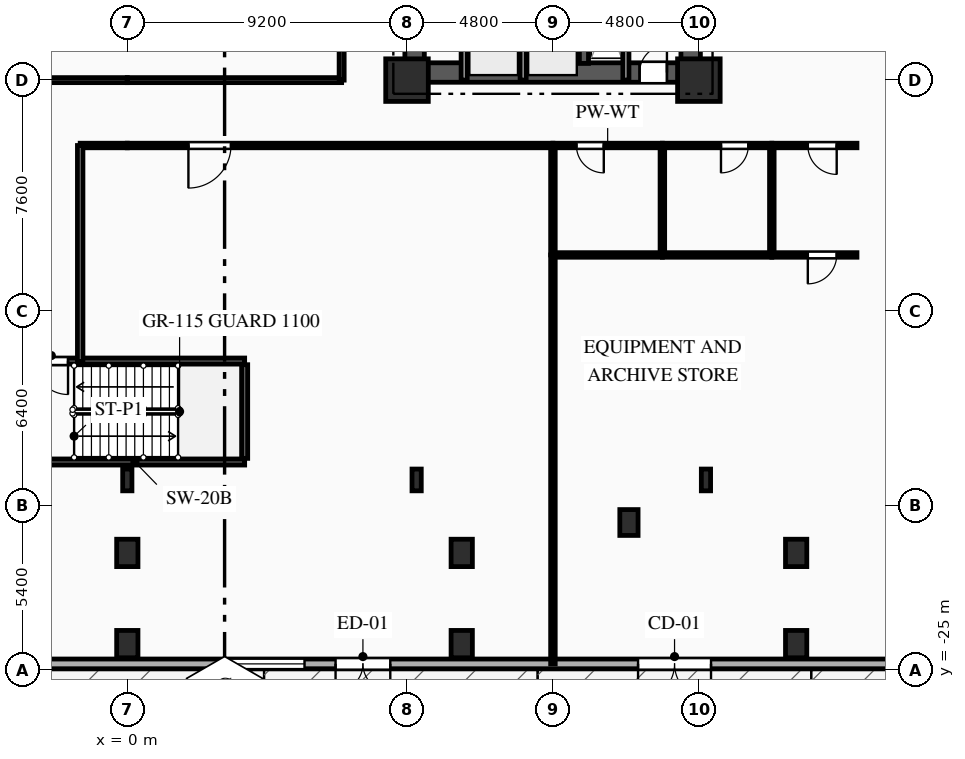
"""IFC4 building model, lengths in metres.
Left out: names, types, materials, properties, quantities, classifications, styles, units other than length and angle.
Written with IfcOpenShell. Run it as: python <this file> out.ifc"""

import sys

from ifc_helpers import new_model, si_unit, direction, frame, frame_2d, origin, origin_2d, place, context, subcontext, project, spatial, rectangle, i_section, extrude, element, fill, save


model = new_model("IFC4")
c1 = context("Model", 3, precision=1e-05, world=origin(), true_north=direction((0.0, 1.0)))
c2 = subcontext(c1, "Body", "Model", "MODEL_VIEW")
j1 = project(units=[si_unit("LENGTHUNIT", "METRE"), si_unit("PLANEANGLEUNIT", "RADIAN")], contexts=[c1])
p1 = place(None, origin())
s1 = spatial("IfcSite", under=j1, at=p1, CompositionType="ELEMENT")
p2 = place(p1, origin())
s2 = spatial("IfcBuilding", under=s1, at=p2, CompositionType="ELEMENT")
p3 = place(p2, origin())
s3 = spatial("IfcBuildingStorey", under=s2, at=p3, CompositionType="ELEMENT", Elevation=0.0)
for number, where, z_axis, x_axis in (
    (1, (9.2, -5.6, 0.0), (0.0, 0.0, 1.0), (1.0, 0.0, 0.0)),
    (2, (18.8, -5.6, 0.0), (0.0, 0.0, 1.0), (1.0, 0.0, 0.0)),
):
    element("IfcColumn", number, at=place(p3, frame(where, z_axis=z_axis, x_axis=x_axis)), inside=s3, PredefinedType="COLUMN", context=c2, shape_type="SweptSolid", body=[
        extrude(rectangle(XDim=1.4, YDim=1.4, at=origin_2d()), origin(), (0.0, 0.0, 1.0), 4.5),
    ])
for number, where, z_axis, x_axis in (
    (3, (0.0, -21.15, 0.0), (0.0, 0.0, 1.0), (1.0, 0.0, 0.0)),
    (4, (11.0, -21.15, 0.0), (0.0, 0.0, 1.0), (1.0, 0.0, 0.0)),
    (5, (22.0, -21.15, 0.0), (0.0, 0.0, 1.0), (1.0, 0.0, 0.0)),
    (6, (0.0, -24.15, 0.0), (0.0, 0.0, 1.0), (1.0, 0.0, 0.0)),
    (7, (11.0, -24.15, 0.0), (0.0, 0.0, 1.0), (1.0, 0.0, 0.0)),
    (8, (22.0, -24.15, 0.0), (0.0, 0.0, 1.0), (1.0, 0.0, 0.0)),
):
    element("IfcColumn", number, at=place(p3, frame(where, z_axis=z_axis, x_axis=x_axis)), inside=s3, PredefinedType="COLUMN", context=c2, shape_type="SweptSolid", body=[
        extrude(rectangle(XDim=0.7, YDim=0.9, at=origin_2d()), origin(), (0.0, 0.0, 1.0), 4.5),
    ])
p4 = place(p3, frame((16.5, -20.15, 0.0), z_axis=(0.0, 0.0, 1.0), x_axis=(1.0, 0.0, 0.0)))
e9 = element("IfcColumn", 9, at=p4, inside=s3, PredefinedType="PILASTER", context=c2, shape_type="SweptSolid", body=[
    extrude(rectangle(XDim=0.6, YDim=0.85, at=origin_2d()), origin(), (0.0, 0.0, 1.0), 4.5),
])
for number, where, z_axis, x_axis in (
    (10, (0.0, -18.75, 0.0), (0.0, 0.0, 1.0), (1.0, 0.0, 0.0)),
    (11, (9.517, -18.75, 0.0), (0.0, 0.0, 1.0), (1.0, 0.0, 0.0)),
    (12, (19.033, -18.75, 0.0), (0.0, 0.0, 1.0), (1.0, 0.0, 0.0)),
):
    element("IfcColumn", number, at=place(p3, frame(where, z_axis=z_axis, x_axis=x_axis)), inside=s3, PredefinedType="COLUMN", context=c2, shape_type="SweptSolid", body=[
        extrude(i_section(OverallWidth=0.304, OverallDepth=0.716, WebThickness=0.021, FlangeThickness=0.04, FilletRadius=0.027, at=origin_2d()), origin(), (0.0, 0.0, 1.0), 4.5),
    ])
p5 = place(p3, frame((38.3, -24.8, 0.0), z_axis=(0.0, 0.0, 1.0), x_axis=(-1.0, 0.0, 0.0)))
e13 = element("IfcWall", 13, at=p5, inside=s3, PredefinedType="SOLIDWALL", context=c2, shape_type="SweptSolid", body=[
    extrude(rectangle(XDim=76.6, YDim=0.32, at=frame_2d((38.3, 0.0))), origin(), (0.0, 0.0, 1.0), 4.17),
])
p6 = place(p5, frame((64.4, 0.0, 0.0)))
e14 = element("IfcOpeningElement", 14, at=p6, cuts=e13, PredefinedType="OPENING", context=c2, shape_type="SweptSolid", body=[
    extrude(rectangle(XDim=1.8, YDim=2.4, at=frame_2d((0.9, 1.2))), frame((0.0, 0.17, 0.0), z_axis=(0.0, -1.0, 0.0), x_axis=(1.0, 0.0, 0.0)), (0.0, 0.0, 1.0), 0.34),
])
p7 = place(p5, frame((45.15, 0.0, 0.0)))
e15 = element("IfcOpeningElement", 15, at=p7, cuts=e13, PredefinedType="OPENING", context=c2, shape_type="SweptSolid", body=[
    extrude(rectangle(XDim=1.8, YDim=2.4, at=frame_2d((0.9, 1.2))), frame((0.0, 0.17, 0.0), z_axis=(0.0, -1.0, 0.0), x_axis=(1.0, 0.0, 0.0)), (0.0, 0.0, 1.0), 0.34),
])
p8 = place(p5, frame((29.65, 0.0, 0.0)))
e16 = element("IfcOpeningElement", 16, at=p8, cuts=e13, PredefinedType="OPENING", context=c2, shape_type="SweptSolid", body=[
    extrude(rectangle(XDim=1.8, YDim=2.4, at=frame_2d((0.9, 1.2))), frame((0.0, 0.17, 0.0), z_axis=(0.0, -1.0, 0.0), x_axis=(1.0, 0.0, 0.0)), (0.0, 0.0, 1.0), 0.34),
])
p9 = place(p5, frame((10.4, 0.0, 0.0)))
e17 = element("IfcOpeningElement", 17, at=p9, cuts=e13, PredefinedType="OPENING", context=c2, shape_type="SweptSolid", body=[
    extrude(rectangle(XDim=1.8, YDim=2.4, at=frame_2d((0.9, 1.2))), frame((0.0, 0.17, 0.0), z_axis=(0.0, -1.0, 0.0), x_axis=(1.0, 0.0, 0.0)), (0.0, 0.0, 1.0), 0.34),
])
p10 = place(p5, frame((55.1, 0.0, 0.0)))
e18 = element("IfcOpeningElement", 18, at=p10, cuts=e13, PredefinedType="OPENING", context=c2, shape_type="SweptSolid", body=[
    extrude(rectangle(XDim=2.4, YDim=2.6, at=frame_2d((1.2, 1.3))), frame((0.0, 0.17, 0.0), z_axis=(0.0, -1.0, 0.0), x_axis=(1.0, 0.0, 0.0)), (0.0, 0.0, 1.0), 0.34),
])
p11 = place(p5, frame((19.1, 0.0, 0.0)))
e19 = element("IfcOpeningElement", 19, at=p11, cuts=e13, PredefinedType="OPENING", context=c2, shape_type="SweptSolid", body=[
    extrude(rectangle(XDim=2.4, YDim=2.6, at=frame_2d((1.2, 1.3))), frame((0.0, 0.17, 0.0), z_axis=(0.0, -1.0, 0.0), x_axis=(1.0, 0.0, 0.0)), (0.0, 0.0, 1.0), 0.34),
])
p12 = place(p5, frame((32.471, 0.0, 0.85)))
e20 = element("IfcOpeningElement", 20, at=p12, cuts=e13, PredefinedType="OPENING", context=c2, shape_type="SweptSolid", body=[
    extrude(rectangle(XDim=2.8, YDim=2.4, at=frame_2d((1.4, 1.2))), frame((0.0, 0.17, 0.0), z_axis=(0.0, -1.0, 0.0), x_axis=(1.0, 0.0, 0.0)), (0.0, 0.0, 1.0), 0.34),
])
p13 = place(p5, frame((50.587, 0.0, 0.85)))
e21 = element("IfcOpeningElement", 21, at=p13, cuts=e13, PredefinedType="OPENING", context=c2, shape_type="SweptSolid", body=[
    extrude(rectangle(XDim=2.8, YDim=2.4, at=frame_2d((1.4, 1.2))), frame((0.0, 0.17, 0.0), z_axis=(0.0, -1.0, 0.0), x_axis=(1.0, 0.0, 0.0)), (0.0, 0.0, 1.0), 0.34),
])
p14 = place(p3, frame((9.2, -5.35, 0.0), z_axis=(0.0, 0.0, 1.0), x_axis=(1.0, 0.0, 0.0)))
e22 = element("IfcWall", 22, at=p14, inside=s3, PredefinedType="SHEAR", context=c2, shape_type="SweptSolid", body=[
    extrude(rectangle(XDim=9.6, YDim=0.64, at=frame_2d((4.8, 0.0))), origin(), (0.0, 0.0, 1.0), 4.17),
])
p15 = place(p14, frame((7.65, 0.0, 0.0)))
e23 = element("IfcOpeningElement", 23, at=p15, cuts=e22, PredefinedType="OPENING", context=c2, shape_type="SweptSolid", body=[
    extrude(rectangle(XDim=0.9, YDim=2.1, at=frame_2d((0.45, 1.05))), frame((0.0, 0.33, 0.0), z_axis=(0.0, -1.0, 0.0), x_axis=(1.0, 0.0, 0.0)), (0.0, 0.0, 1.0), 0.66),
])
p16 = place(p3, frame((9.45, -5.05, 0.0), z_axis=(0.0, 0.0, 1.0), x_axis=(0.0, 1.0, 0.0)))
e24 = element("IfcWall", 24, at=p16, inside=s3, PredefinedType="SHEAR", context=c2, shape_type="SweptSolid", body=[
    extrude(rectangle(XDim=10.1, YDim=0.64, at=frame_2d((5.05, 0.0))), origin(), (0.0, 0.0, 1.0), 4.17),
])
p17 = place(p16, frame((7.15, 0.0, 0.0)))
e25 = element("IfcOpeningElement", 25, at=p17, cuts=e24, PredefinedType="OPENING", context=c2, shape_type="SweptSolid", body=[
    extrude(rectangle(XDim=0.9, YDim=2.1, at=frame_2d((0.45, 1.05))), frame((0.0, 0.33, 0.0), z_axis=(0.0, -1.0, 0.0), x_axis=(1.0, 0.0, 0.0)), (0.0, 0.0, 1.0), 0.66),
])
p18 = place(p16, frame((2.4, 0.0, 0.0)))
e26 = element("IfcOpeningElement", 26, at=p18, cuts=e24, PredefinedType="OPENING", context=c2, shape_type="SweptSolid", body=[
    extrude(rectangle(XDim=1.2, YDim=2.15, at=frame_2d((0.6, 1.075))), frame((0.0, 0.33, 0.0), z_axis=(0.0, -1.0, 0.0), x_axis=(1.0, 0.0, 0.0)), (0.0, 0.0, 1.0), 0.66),
])
p19 = place(p3, frame((18.53, -5.05, 0.0), z_axis=(0.0, 0.0, 1.0), x_axis=(0.0, 1.0, 0.0)))
e27 = element("IfcWall", 27, at=p19, inside=s3, PredefinedType="SHEAR", context=c2, shape_type="SweptSolid", body=[
    extrude(rectangle(XDim=10.1, YDim=0.64, at=frame_2d((5.05, 0.0))), origin(), (0.0, 0.0, 1.0), 4.17),
])
p20 = place(p3, frame((15.02, -5.05, 0.0), z_axis=(0.0, 0.0, 1.0), x_axis=(0.0, 1.0, 0.0)))
e28 = element("IfcWall", 28, at=p20, inside=s3, PredefinedType="SHEAR", context=c2, shape_type="SweptSolid", body=[
    extrude(rectangle(XDim=10.1, YDim=0.3, at=frame_2d((5.05, 0.0))), origin(), (0.0, 0.0, 1.0), 4.17),
])
p21 = place(p3, frame((3.86, -14.84, 0.0), z_axis=(0.0, 0.0, 1.0), x_axis=(-1.0, 0.0, 0.0)))
e29 = element("IfcWall", 29, at=p21, inside=s3, PredefinedType="SHEAR", context=c2, shape_type="SweptSolid", body=[
    extrude(rectangle(XDim=7.22, YDim=0.2, at=frame_2d((3.61, 0.0))), origin(), (0.0, 0.0, 1.0), 4.17),
])
p22 = place(p21, frame((5.81, 0.0, 0.0)))
e30 = element("IfcOpeningElement", 30, at=p22, cuts=e29, PredefinedType="OPENING", context=c2, shape_type="SweptSolid", body=[
    extrude(rectangle(XDim=1.1, YDim=2.15, at=frame_2d((0.55, 1.075))), frame((0.0, 0.11, 0.0), z_axis=(0.0, -1.0, 0.0), x_axis=(1.0, 0.0, 0.0)), (0.0, 0.0, 1.0), 0.22),
])
p23 = place(p3, frame((-3.36, -18.16, 0.0), z_axis=(0.0, 0.0, 1.0), x_axis=(1.0, 0.0, 0.0)))
e31 = element("IfcWall", 31, at=p23, inside=s3, PredefinedType="SHEAR", context=c2, shape_type="SweptSolid", body=[
    extrude(rectangle(XDim=7.22, YDim=0.2, at=frame_2d((3.61, 0.0))), origin(), (0.0, 0.0, 1.0), 4.17),
])
p24 = place(p3, frame((3.86, -18.04, 0.0), z_axis=(0.0, 0.0, 1.0), x_axis=(0.0, 1.0, 0.0)))
e32 = element("IfcWall", 32, at=p24, inside=s3, PredefinedType="SHEAR", context=c2, shape_type="SweptSolid", body=[
    extrude(rectangle(XDim=3.08, YDim=0.2, at=frame_2d((1.54, 0.0))), origin(), (0.0, 0.0, 1.0), 4.17),
])
p25 = place(p3, frame((16.4, -2.11, 0.0), z_axis=(0.0, 0.0, 1.0), x_axis=(0.0, -1.0, 0.0)))
e33 = element("IfcWall", 33, at=p25, inside=s3, PredefinedType="PARTITIONING", context=c2, shape_type="SweptSolid", body=[
    extrude(rectangle(XDim=3.49, YDim=0.2, at=frame_2d((1.745, 0.0))), origin(), (0.0, 0.0, 1.0), 4.17),
])
for number, where, z_axis, x_axis in (
    (34, (11.08, -5.6, 0.0), (0.0, 0.0, 1.0), (0.0, 1.0, 0.0)),
    (35, (13.02, -5.6, 0.0), (0.0, 0.0, 1.0), (0.0, 1.0, 0.0)),
):
    element("IfcWall", number, at=place(p3, frame(where, z_axis=z_axis, x_axis=x_axis)), inside=s3, PredefinedType="PARTITIONING", context=c2, shape_type="SweptSolid", body=[
        extrude(rectangle(XDim=2.25, YDim=0.2, at=frame_2d((1.125, 0.0))), origin(), (0.0, 0.0, 1.0), 4.17),
    ])
p26 = place(p3, frame((0.0, -7.75, 0.0), z_axis=(0.0, 0.0, 1.0), x_axis=(-1.0, 0.0, 0.0)))
e36 = element("IfcWall", 36, at=p26, inside=s3, PredefinedType="PARTITIONING", context=c2, shape_type="SweptSolid", body=[
    extrude(rectangle(XDim=1.55, YDim=0.15, at=frame_2d((0.775, 0.0))), origin(), (0.0, 0.0, 1.0), 4.17),
])
p27 = place(p3, frame((-7.05, -5.6, 0.0), z_axis=(0.0, 0.0, 1.0), x_axis=(1.0, 0.0, 0.0)))
e37 = element("IfcWall", 37, at=p27, inside=s3, PredefinedType="PARTITIONING", context=c2, shape_type="SweptSolid", body=[
    extrude(rectangle(XDim=7.05, YDim=0.165, at=frame_2d((3.525, 0.0))), origin(), (0.0, 0.0, 1.0), 3.655),
])
p28 = place(p3, frame((14.0, -7.75, 0.0), z_axis=(0.0, 0.0, 1.0), x_axis=(-1.0, 0.0, 0.0)))
e38 = element("IfcWall", 38, at=p28, inside=s3, PredefinedType="PARTITIONING", context=c2, shape_type="SweptSolid", body=[
    extrude(rectangle(XDim=14.0, YDim=0.15, at=frame_2d((7.0, 0.0))), origin(), (0.0, 0.0, 1.0), 4.17),
])
p29 = place(p28, frame((10.59, 0.0, 0.0)))
e39 = element("IfcOpeningElement", 39, at=p29, cuts=e38, PredefinedType="OPENING", context=c2, shape_type="SweptSolid", body=[
    extrude(rectangle(XDim=1.4, YDim=2.3, at=frame_2d((0.7, 1.15))), frame((0.0, 0.085, 0.0), z_axis=(0.0, -1.0, 0.0), x_axis=(1.0, 0.0, 0.0)), (0.0, 0.0, 1.0), 0.17),
])
p30 = place(p3, frame((17.6, -7.75, 0.0), z_axis=(0.0, 0.0, 1.0), x_axis=(-1.0, 0.0, 0.0)))
e40 = element("IfcWall", 40, at=p30, inside=s3, PredefinedType="PLUMBINGWALL", context=c2, shape_type="SweptSolid", body=[
    extrude(rectangle(XDim=3.6, YDim=0.15, at=frame_2d((1.8, 0.0))), origin(), (0.0, 0.0, 1.0), 4.17),
])
p31 = place(p30, frame((1.927, 0.0, 0.0)))
e41 = element("IfcOpeningElement", 41, at=p31, cuts=e40, PredefinedType="OPENING", context=c2, shape_type="SweptSolid", body=[
    extrude(rectangle(XDim=0.9, YDim=2.1, at=frame_2d((0.45, 1.05))), frame((0.0, 0.085, 0.0), z_axis=(0.0, -1.0, 0.0), x_axis=(1.0, 0.0, 0.0)), (0.0, 0.0, 1.0), 0.17),
])
p32 = place(p3, frame((21.2, -7.75, 0.0), z_axis=(0.0, 0.0, 1.0), x_axis=(-1.0, 0.0, 0.0)))
e42 = element("IfcWall", 42, at=p32, inside=s3, PredefinedType="PLUMBINGWALL", context=c2, shape_type="SweptSolid", body=[
    extrude(rectangle(XDim=3.6, YDim=0.15, at=frame_2d((1.8, 0.0))), origin(), (0.0, 0.0, 1.0), 4.17),
])
p33 = place(p32, frame((0.772, 0.0, 0.0)))
e43 = element("IfcOpeningElement", 43, at=p33, cuts=e42, PredefinedType="OPENING", context=c2, shape_type="SweptSolid", body=[
    extrude(rectangle(XDim=0.9, YDim=2.1, at=frame_2d((0.45, 1.05))), frame((0.0, 0.085, 0.0), z_axis=(0.0, -1.0, 0.0), x_axis=(1.0, 0.0, 0.0)), (0.0, 0.0, 1.0), 0.17),
])
p34 = place(p3, frame((24.0, -7.75, 0.0), z_axis=(0.0, 0.0, 1.0), x_axis=(-1.0, 0.0, 0.0)))
e44 = element("IfcWall", 44, at=p34, inside=s3, PredefinedType="PARTITIONING", context=c2, shape_type="SweptSolid", body=[
    extrude(rectangle(XDim=2.8, YDim=0.15, at=frame_2d((1.4, 0.0))), origin(), (0.0, 0.0, 1.0), 4.17),
])
p35 = place(p34, frame((0.666, 0.0, 0.0)))
e45 = element("IfcOpeningElement", 45, at=p35, cuts=e44, PredefinedType="OPENING", context=c2, shape_type="SweptSolid", body=[
    extrude(rectangle(XDim=0.95, YDim=2.1, at=frame_2d((0.475, 1.05))), frame((0.0, 0.085, 0.0), z_axis=(0.0, -1.0, 0.0), x_axis=(1.0, 0.0, 0.0)), (0.0, 0.0, 1.0), 0.17),
])
p36 = place(p3, frame((0.0, -5.6, 0.0), z_axis=(0.0, 0.0, 1.0), x_axis=(1.0, 0.0, 0.0)))
e46 = element("IfcWall", 46, at=p36, inside=s3, PredefinedType="PARTITIONING", context=c2, shape_type="SweptSolid", body=[
    extrude(rectangle(XDim=7.05, YDim=0.165, at=frame_2d((3.525, 0.0))), origin(), (0.0, 0.0, 1.0), 3.655),
])
p37 = place(p3, frame((7.05, -5.6, 0.0), z_axis=(0.0, 0.0, 1.0), x_axis=(0.0, 1.0, 0.0)))
e47 = element("IfcWall", 47, at=p37, inside=s3, PredefinedType="PARTITIONING", context=c2, shape_type="SweptSolid", body=[
    extrude(rectangle(XDim=14.1, YDim=0.165, at=frame_2d((7.05, 0.0))), origin(), (0.0, 0.0, 1.0), 4.17),
])
p38 = place(p3, frame((-1.55, -7.75, 0.0), z_axis=(0.0, 0.0, 1.0), x_axis=(0.0, -1.0, 0.0)))
e48 = element("IfcWall", 48, at=p38, inside=s3, PredefinedType="PARTITIONING", context=c2, shape_type="SweptSolid", body=[
    extrude(rectangle(XDim=7.11, YDim=0.18, at=frame_2d((3.555, 0.0))), origin(), (0.0, 0.0, 1.0), 4.17),
])
p39 = place(p3, frame((14.0, -7.75, 0.0), z_axis=(0.0, 0.0, 1.0), x_axis=(0.0, -1.0, 0.0)))
e49 = element("IfcWall", 49, at=p39, inside=s3, PredefinedType="PLUMBINGWALL", context=c2, shape_type="SweptSolid", body=[
    extrude(rectangle(XDim=3.6, YDim=0.15, at=frame_2d((1.8, 0.0))), origin(), (0.0, 0.0, 1.0), 4.17),
])
p40 = place(p3, frame((14.0, -11.35, 0.0), z_axis=(0.0, 0.0, 1.0), x_axis=(0.0, -1.0, 0.0)))
e50 = element("IfcWall", 50, at=p40, inside=s3, PredefinedType="PARTITIONING", context=c2, shape_type="SweptSolid", body=[
    extrude(rectangle(XDim=13.45, YDim=0.15, at=frame_2d((6.725, 0.0))), origin(), (0.0, 0.0, 1.0), 4.17),
])
for number, where, z_axis, x_axis in (
    (51, (17.6, -7.75, 0.0), (0.0, 0.0, 1.0), (0.0, -1.0, 0.0)),
    (52, (17.6, -11.35, 0.0), (0.0, 0.0, 1.0), (-1.0, 0.0, 0.0)),
    (53, (21.2, -7.75, 0.0), (0.0, 0.0, 1.0), (0.0, -1.0, 0.0)),
):
    element("IfcWall", number, at=place(p3, frame(where, z_axis=z_axis, x_axis=x_axis)), inside=s3, PredefinedType="PLUMBINGWALL", context=c2, shape_type="SweptSolid", body=[
        extrude(rectangle(XDim=3.6, YDim=0.15, at=frame_2d((1.8, 0.0))), origin(), (0.0, 0.0, 1.0), 4.17),
    ])
p41 = place(p3, frame((21.2, -11.35, 0.0), z_axis=(0.0, 0.0, 1.0), x_axis=(-1.0, 0.0, 0.0)))
e54 = element("IfcWall", 54, at=p41, inside=s3, PredefinedType="PLUMBINGWALL", context=c2, shape_type="SweptSolid", body=[
    extrude(rectangle(XDim=3.6, YDim=0.15, at=frame_2d((1.8, 0.0))), origin(), (0.0, 0.0, 1.0), 4.17),
])
p42 = place(p3, frame((24.0, -11.35, 0.0), z_axis=(0.0, 0.0, 1.0), x_axis=(-1.0, 0.0, 0.0)))
e55 = element("IfcWall", 55, at=p42, inside=s3, PredefinedType="PARTITIONING", context=c2, shape_type="SweptSolid", body=[
    extrude(rectangle(XDim=2.8, YDim=0.15, at=frame_2d((1.4, 0.0))), origin(), (0.0, 0.0, 1.0), 4.17),
])
p43 = place(p42, frame((0.666, 0.0, 0.0)))
e56 = element("IfcOpeningElement", 56, at=p43, cuts=e55, PredefinedType="OPENING", context=c2, shape_type="SweptSolid", body=[
    extrude(rectangle(XDim=0.95, YDim=2.1, at=frame_2d((0.475, 1.05))), frame((0.0, 0.085, 0.0), z_axis=(0.0, -1.0, 0.0), x_axis=(1.0, 0.0, 0.0)), (0.0, 0.0, 1.0), 0.17),
])
p44 = place(p8, origin())
e57 = element("IfcDoor", 57, at=p44, inside=s3, OperationType="DOUBLE_DOOR_SINGLE_SWING", PredefinedType="DOOR", context=c2, shape_type="SweptSolid", body=[
    extrude(rectangle(XDim=1.8, YDim=2.4, at=frame_2d((0.9, 1.2))), frame((0.0, 0.025, 0.0), z_axis=(0.0, -1.0, 0.0), x_axis=(1.0, 0.0, 0.0)), (0.0, 0.0, 1.0), 0.05),
])
fill(e16, e57)
p45 = place(p11, origin())
e58 = element("IfcDoor", 58, at=p45, inside=s3, OperationType="DOUBLE_DOOR_SINGLE_SWING", PredefinedType="DOOR", context=c2, shape_type="SweptSolid", body=[
    extrude(rectangle(XDim=2.4, YDim=2.6, at=frame_2d((1.2, 1.3))), frame((0.0, 0.025, 0.0), z_axis=(0.0, -1.0, 0.0), x_axis=(1.0, 0.0, 0.0)), (0.0, 0.0, 1.0), 0.05),
])
fill(e19, e58)
p46 = place(p12, origin())
e59 = element("IfcWindow", 59, at=p46, inside=s3, PartitioningType="SINGLE_PANEL", PredefinedType="WINDOW", context=c2, shape_type="SweptSolid", body=[
    extrude(rectangle(XDim=2.8, YDim=2.4, at=frame_2d((1.4, 1.2))), frame((0.0, 0.03, 0.0), z_axis=(0.0, -1.0, 0.0), x_axis=(1.0, 0.0, 0.0)), (0.0, 0.0, 1.0), 0.06),
])
fill(e20, e59)
p47 = place(p15, origin())
e60 = element("IfcDoor", 60, at=p47, inside=s3, OperationType="SINGLE_SWING_RIGHT", PredefinedType="DOOR", context=c2, shape_type="SweptSolid", body=[
    extrude(rectangle(XDim=0.9, YDim=2.1, at=frame_2d((0.45, 1.05))), frame((0.0, 0.025, 0.0), z_axis=(0.0, -1.0, 0.0), x_axis=(1.0, 0.0, 0.0)), (0.0, 0.0, 1.0), 0.05),
])
fill(e23, e60)
p48 = place(p22, origin())
e61 = element("IfcDoor", 61, at=p48, inside=s3, OperationType="SINGLE_SWING_LEFT", PredefinedType="DOOR", context=c2, shape_type="SweptSolid", body=[
    extrude(rectangle(XDim=1.1, YDim=2.15, at=frame_2d((0.55, 1.075))), frame((0.0, 0.025, 0.0), z_axis=(0.0, -1.0, 0.0), x_axis=(1.0, 0.0, 0.0)), (0.0, 0.0, 1.0), 0.05),
])
fill(e30, e61)
p49 = place(p29, origin())
e62 = element("IfcDoor", 62, at=p49, inside=s3, OperationType="SINGLE_SWING_RIGHT", PredefinedType="DOOR", context=c2, shape_type="SweptSolid", body=[
    extrude(rectangle(XDim=1.4, YDim=2.3, at=frame_2d((0.7, 1.15))), frame((0.0, 0.025, 0.0), z_axis=(0.0, -1.0, 0.0), x_axis=(1.0, 0.0, 0.0)), (0.0, 0.0, 1.0), 0.05),
])
fill(e39, e62)
p50 = place(p31, origin())
e63 = element("IfcDoor", 63, at=p50, inside=s3, OperationType="SINGLE_SWING_LEFT", PredefinedType="DOOR", context=c2, shape_type="SweptSolid", body=[
    extrude(rectangle(XDim=0.9, YDim=2.1, at=frame_2d((0.45, 1.05))), frame((0.0, 0.025, 0.0), z_axis=(0.0, -1.0, 0.0), x_axis=(1.0, 0.0, 0.0)), (0.0, 0.0, 1.0), 0.05),
])
fill(e41, e63)
p51 = place(p33, origin())
e64 = element("IfcDoor", 64, at=p51, inside=s3, OperationType="SINGLE_SWING_RIGHT", PredefinedType="DOOR", context=c2, shape_type="SweptSolid", body=[
    extrude(rectangle(XDim=0.9, YDim=2.1, at=frame_2d((0.45, 1.05))), frame((0.0, 0.025, 0.0), z_axis=(0.0, -1.0, 0.0), x_axis=(1.0, 0.0, 0.0)), (0.0, 0.0, 1.0), 0.05),
])
fill(e43, e64)
p52 = place(p35, origin())
e65 = element("IfcDoor", 65, at=p52, inside=s3, OperationType="SINGLE_SWING_LEFT", PredefinedType="DOOR", context=c2, shape_type="SweptSolid", body=[
    extrude(rectangle(XDim=0.95, YDim=2.1, at=frame_2d((0.475, 1.05))), frame((0.0, 0.025, 0.0), z_axis=(0.0, -1.0, 0.0), x_axis=(1.0, 0.0, 0.0)), (0.0, 0.0, 1.0), 0.05),
])
fill(e45, e65)
p53 = place(p43, origin())
e66 = element("IfcDoor", 66, at=p53, inside=s3, OperationType="SINGLE_SWING_RIGHT", PredefinedType="DOOR", context=c2, shape_type="SweptSolid", body=[
    extrude(rectangle(XDim=0.95, YDim=2.1, at=frame_2d((0.475, 1.05))), frame((0.0, 0.025, 0.0), z_axis=(0.0, -1.0, 0.0), x_axis=(1.0, 0.0, 0.0)), (0.0, 0.0, 1.0), 0.05),
])
fill(e56, e66)
save(model, sys.argv[1])
